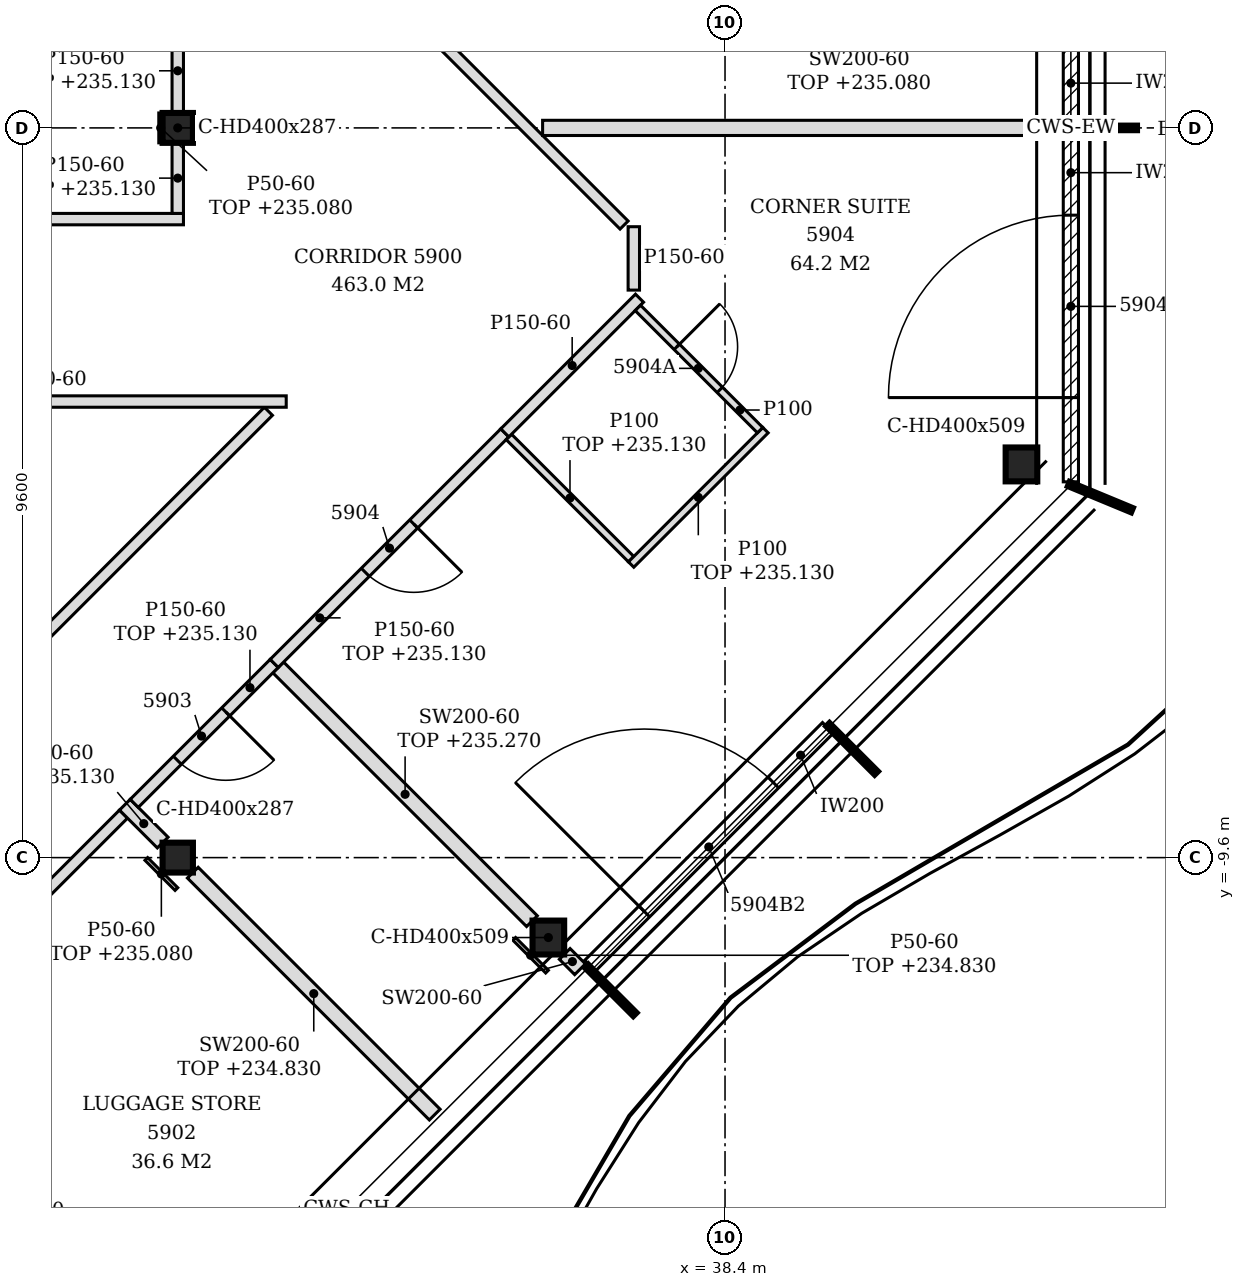
"""IFC4 building model, lengths in metres.
Left out: names, types, materials, properties, quantities, classifications, styles, units other than length and angle.
Written with IfcOpenShell. Run it as: python <this file> out.ifc"""

import sys

from ifc_helpers import new_model, si_unit, direction, frame, frame_2d, origin, origin_2d, place, context, subcontext, project, spatial, polyline, rectangle, i_section, outline, extrude, element, fill, save


model = new_model("IFC4")
c1 = context("Model", 3, precision=1e-05, world=origin(), true_north=direction((0.0, 1.0)))
c2 = subcontext(c1, "Body", "Model", "MODEL_VIEW")
j1 = project(units=[si_unit("LENGTHUNIT", "METRE"), si_unit("PLANEANGLEUNIT", "RADIAN")], contexts=[c1])
p1 = place(None, origin())
s1 = spatial("IfcSite", under=j1, at=p1, CompositionType="ELEMENT")
p2 = place(p1, origin())
s2 = spatial("IfcBuilding", under=s1, at=p2, CompositionType="ELEMENT")
p3 = place(p2, frame((0.0, 0.0, 232.2)))
s3 = spatial("IfcBuildingStorey", under=s2, at=p3, CompositionType="ELEMENT", Elevation=232.2)
for number, where, z_axis, x_axis in (
    (1, (36.076, -10.652, -0.15), (0.0, 0.0, 1.0), (1.0, 0.0, 0.0)),
    (2, (42.3, -4.427, -0.15), (0.0, 0.0, 1.0), (1.0, 0.0, 0.0)),
):
    element("IfcColumn", number, at=place(p3, frame(where, z_axis=z_axis, x_axis=x_axis)), inside=s3, PredefinedType="COLUMN", context=c2, shape_type="SweptSolid", body=[
        extrude(i_section(OverallWidth=0.416, OverallDepth=0.446, WebThickness=0.039, FlangeThickness=0.063, FilletRadius=0.015, at=origin_2d()), origin(), (0.0, 0.0, 1.0), 3.6),
    ])
for number, where, z_axis, x_axis in (
    (3, (31.2, -9.6, -0.15), (0.0, 0.0, 1.0), (1.0, 0.0, 0.0)),
    (4, (31.2, 0.0, -0.15), (0.0, 0.0, 1.0), (1.0, 0.0, 0.0)),
):
    element("IfcColumn", number, at=place(p3, frame(where, z_axis=z_axis, x_axis=x_axis)), inside=s3, PredefinedType="COLUMN", context=c2, shape_type="SweptSolid", body=[
        extrude(i_section(OverallWidth=0.399, OverallDepth=0.393, WebThickness=0.023, FlangeThickness=0.037, FilletRadius=0.015, at=origin_2d()), origin(), (0.0, 0.0, 1.0), 3.6),
    ])
p4 = place(p3, frame((36.62, -11.026, 0.0), z_axis=(0.0, 0.0, 1.0), x_axis=(0.707106781187, 0.707106781187, 0.0)))
e5 = element("IfcWall", 5, at=p4, inside=s3, PredefinedType="NOTDEFINED", context=c2, shape_type="SweptSolid", body=[
    extrude(rectangle(XDim=4.431, YDim=0.2, at=frame_2d((2.215, 0.0))), origin(), (0.0, 0.0, 1.0), 3.45),
])
p5 = place(p4, frame((1.015, 0.0, 0.0)))
e6 = element("IfcOpeningElement", 6, at=p5, cuts=e5, PredefinedType="OPENING", context=c2, shape_type="SweptSolid", body=[
    extrude(rectangle(XDim=2.4, YDim=2.4, at=frame_2d((1.2, 1.2))), frame((0.0, 0.11, 0.0), z_axis=(0.0, -1.0, 0.0), x_axis=(1.0, 0.0, 0.0)), (0.0, 0.0, 1.0), 0.22),
])
p6 = place(p3, frame((42.95, -4.656, 0.0), z_axis=(0.0, 0.0, 1.0), x_axis=(0.0, 1.0, 0.0)))
e7 = element("IfcWall", 7, at=p6, inside=s3, PredefinedType="NOTDEFINED", context=c2, shape_type="SweptSolid", body=[
    extrude(rectangle(XDim=4.626, YDim=0.2, at=frame_2d((2.313, 0.0))), origin(), (0.0, 0.0, 1.0), 3.45),
])
p7 = place(p6, frame((1.108, 0.0, 0.0)))
e8 = element("IfcOpeningElement", 8, at=p7, cuts=e7, PredefinedType="OPENING", context=c2, shape_type="SweptSolid", body=[
    extrude(rectangle(XDim=2.4, YDim=2.4, at=frame_2d((1.2, 1.2))), frame((0.0, 0.11, 0.0), z_axis=(0.0, -1.0, 0.0), x_axis=(1.0, 0.0, 0.0)), (0.0, 0.0, 1.0), 0.22),
])
p8 = place(p3, frame((42.95, 0.03, 0.0), z_axis=(0.0, 0.0, 1.0), x_axis=(0.0, 1.0, 0.0)))
e9 = element("IfcWall", 9, at=p8, inside=s3, PredefinedType="NOTDEFINED", context=c2, shape_type="SweptSolid", body=[
    extrude(rectangle(XDim=4.626, YDim=0.2, at=frame_2d((2.313, 0.0))), origin(), (0.0, 0.0, 1.0), 3.45),
])
p9 = place(p8, frame((1.118, 0.0, 0.0)))
e10 = element("IfcOpeningElement", 10, at=p9, cuts=e9, PredefinedType="OPENING", context=c2, shape_type="SweptSolid", body=[
    extrude(rectangle(XDim=2.4, YDim=2.4, at=frame_2d((1.2, 1.2))), frame((0.0, 0.11, 0.0), z_axis=(0.0, -1.0, 0.0), x_axis=(1.0, 0.0, 0.0)), (0.0, 0.0, 1.0), 0.22),
])
p10 = place(p3, frame((29.636, -16.66, 0.0), z_axis=(0.0, 0.0, 1.0), x_axis=(-0.707207037357, 0.707006510799, 0.0)))
e11 = element("IfcWall", 11, at=p10, inside=s3, PredefinedType="PARTITIONING", context=c2, shape_type="SweptSolid", body=[
    extrude(rectangle(XDim=4.87, YDim=0.2, at=frame_2d((2.435, 0.0))), origin(), (0.0, 0.0, 1.0), 2.88),
])
p11 = place(p3, frame((26.316, -13.199, 0.0), z_axis=(0.0, 0.0, 1.0), x_axis=(0.707024001185, 0.707189551498, 0.0)))
e12 = element("IfcWall", 12, at=p11, inside=s3, PredefinedType="PARTITIONING", context=c2, shape_type="SweptSolid", body=[
    extrude(rectangle(XDim=5.899, YDim=0.15, at=frame_2d((2.949, 0.0))), origin(), (0.0, 0.0, 1.0), 2.88),
])
p12 = place(p11, frame((2.5, 0.0, 0.0)))
e13 = element("IfcOpeningElement", 13, at=p12, cuts=e12, PredefinedType="OPENING", context=c2, shape_type="SweptSolid", body=[
    extrude(rectangle(XDim=0.9, YDim=2.1, at=frame_2d((0.45, 1.05))), frame((0.0, 0.085, 0.0), z_axis=(0.0, -1.0, 0.0), x_axis=(1.0, 0.0, 0.0)), (0.0, 0.0, 1.0), 0.17),
])
p13 = place(p3, frame((34.581, -12.981, 0.0), z_axis=(0.0, 0.0, 1.0), x_axis=(-0.707133900936, 0.707079660397, 0.0)))
e14 = element("IfcWall", 14, at=p13, inside=s3, PredefinedType="PARTITIONING", context=c2, shape_type="SweptSolid", body=[
    extrude(rectangle(XDim=4.501, YDim=0.2, at=frame_2d((2.25, 0.0))), origin(), (0.0, 0.0, 1.0), 2.63),
])
p14 = place(p3, frame((24.468, -11.653, 0.0), z_axis=(0.0, 0.0, 1.0), x_axis=(0.707095889299, 0.707117672906, 0.0)))
e15 = element("IfcWall", 15, at=p14, inside=s3, PredefinedType="PARTITIONING", context=c2, shape_type="SweptSolid", body=[
    extrude(rectangle(XDim=11.208, YDim=0.15, at=frame_2d((5.604, 0.0))), origin(), (0.0, 0.0, 1.0), 2.88),
])
p15 = place(p3, frame((36.493, -11.069, 0.0), z_axis=(0.0, 0.0, 1.0), x_axis=(-0.707534423513, 0.706678880075, 0.0)))
e16 = element("IfcWall", 16, at=p15, inside=s3, PredefinedType="PARTITIONING", context=c2, shape_type="SweptSolid", body=[
    extrude(rectangle(XDim=0.285, YDim=0.2, at=frame_2d((0.143, 0.0))), origin(), (0.0, 0.0, 1.0), 3.45),
])
p16 = place(p3, frame((35.86, -10.436, 0.0), z_axis=(0.0, 0.0, 1.0), x_axis=(-0.707106781187, 0.707106781187, 0.0)))
e17 = element("IfcWall", 17, at=p16, inside=s3, PredefinedType="PARTITIONING", context=c2, shape_type="SweptSolid", body=[
    extrude(rectangle(XDim=4.721, YDim=0.2, at=frame_2d((2.36, 0.0))), origin(), (0.0, 0.0, 1.0), 3.07),
])
p17 = place(p3, frame((31.002, -9.402, 0.0), z_axis=(0.0, 0.0, 1.0), x_axis=(-0.707106781187, 0.707106781187, 0.0)))
e18 = element("IfcWall", 18, at=p17, inside=s3, PredefinedType="PARTITIONING", context=c2, shape_type="SweptSolid", body=[
    extrude(rectangle(XDim=0.704, YDim=0.2, at=frame_2d((0.352, 0.0))), origin(), (0.0, 0.0, 1.0), 2.93),
])
p18 = place(p3, frame((30.628, -8.886, 0.0), z_axis=(0.0, 0.0, 1.0), x_axis=(0.707106781187, 0.707106781187, 0.0)))
e19 = element("IfcWall", 19, at=p18, inside=s3, PredefinedType="PARTITIONING", context=c2, shape_type="SweptSolid", body=[
    extrude(rectangle(XDim=2.604, YDim=0.15, at=frame_2d((1.302, 0.0))), origin(), (0.0, 0.0, 1.0), 2.93),
])
p19 = place(p18, frame((0.802, 0.0, 0.0)))
e20 = element("IfcOpeningElement", 20, at=p19, cuts=e19, PredefinedType="OPENING", context=c2, shape_type="SweptSolid", body=[
    extrude(rectangle(XDim=0.9, YDim=2.1, at=frame_2d((0.45, 1.05))), frame((0.0, 0.085, 0.0), z_axis=(0.0, -1.0, 0.0), x_axis=(1.0, 0.0, 0.0)), (0.0, 0.0, 1.0), 0.17),
])
p20 = place(p3, frame((32.469, -7.045, 0.0), z_axis=(0.0, 0.0, 1.0), x_axis=(0.70722059203, 0.706992952022, 0.0)))
e21 = element("IfcWall", 21, at=p20, inside=s3, PredefinedType="PARTITIONING", context=c2, shape_type="SweptSolid", body=[
    extrude(rectangle(XDim=4.29, YDim=0.15, at=frame_2d((2.145, 0.0))), origin(), (0.0, 0.0, 1.0), 2.93),
])
p21 = place(p20, frame((1.695, 0.0, 0.0)))
e22 = element("IfcOpeningElement", 22, at=p21, cuts=e21, PredefinedType="OPENING", context=c2, shape_type="SweptSolid", body=[
    extrude(rectangle(XDim=0.9, YDim=2.1, at=frame_2d((0.45, 1.05))), frame((0.0, 0.085, 0.0), z_axis=(0.0, -1.0, 0.0), x_axis=(1.0, 0.0, 0.0)), (0.0, 0.0, 1.0), 0.17),
])
p22 = place(p3, frame((37.165, -5.674, 0.0), z_axis=(0.0, 0.0, 1.0), x_axis=(-0.707106781187, 0.707106781187, 0.0)))
e23 = element("IfcWall", 23, at=p22, inside=s3, PredefinedType="PARTITIONING", context=c2, shape_type="SweptSolid", body=[
    extrude(rectangle(XDim=2.275, YDim=0.1, at=frame_2d((1.137, 0.0))), origin(), (0.0, 0.0, 1.0), 2.93),
])
p23 = place(p3, frame((37.165, -5.744, 0.0), z_axis=(0.0, 0.0, 1.0), x_axis=(0.707155609469, 0.707057949532, 0.0)))
e24 = element("IfcWall", 24, at=p23, inside=s3, PredefinedType="PARTITIONING", context=c2, shape_type="SweptSolid", body=[
    extrude(rectangle(XDim=2.5, YDim=0.1, at=frame_2d((1.25, 0.0))), origin(), (0.0, 0.0, 1.0), 2.93),
])
p24 = place(p3, frame((35.503, -4.012, 0.0), z_axis=(0.0, 0.0, 1.0), x_axis=(0.707106781187, 0.707106781187, 0.0)))
e25 = element("IfcWall", 25, at=p24, inside=s3, PredefinedType="PARTITIONING", context=c2, shape_type="SweptSolid", body=[
    extrude(rectangle(XDim=2.506, YDim=0.15, at=frame_2d((1.253, 0.0))), origin(), (0.0, 0.0, 1.0), 3.45),
])
p25 = place(p3, frame((38.862, -3.977, 0.0), z_axis=(0.0, 0.0, 1.0), x_axis=(-0.707106781187, 0.707106781187, 0.0)))
e26 = element("IfcWall", 26, at=p25, inside=s3, PredefinedType="PARTITIONING", context=c2, shape_type="SweptSolid", body=[
    extrude(rectangle(XDim=2.275, YDim=0.1, at=frame_2d((1.137, 0.0))), origin(), (0.0, 0.0, 1.0), 3.45),
])
p26 = place(p25, frame((0.75, 0.0, 0.0)))
e27 = element("IfcOpeningElement", 27, at=p26, cuts=e26, PredefinedType="OPENING", context=c2, shape_type="SweptSolid", body=[
    extrude(rectangle(XDim=0.8, YDim=2.1, at=frame_2d((0.4, 1.05))), frame((0.0, 0.06, 0.0), z_axis=(0.0, -1.0, 0.0), x_axis=(1.0, 0.0, 0.0)), (0.0, 0.0, 1.0), 0.12),
])
p27 = place(p3, frame((19.125, -3.6, 0.0), z_axis=(0.0, 0.0, 1.0), x_axis=(1.0, 0.0, 0.0)))
e28 = element("IfcWall", 28, at=p27, inside=s3, PredefinedType="PARTITIONING", context=c2, shape_type="SweptSolid", body=[
    extrude(outline(polyline([(0.0, 0.0), (13.502, 0.0), (13.502, 3.45), (12.225, 3.45), (12.223, 2.93), (11.925, 2.93), (11.923, 3.45), (0.225, 3.45), (0.223, 2.83), (0.0, 2.83), (0.0, 0.0)])), frame((0.0, 0.075, 0.0), z_axis=(0.0, -1.0, 0.0), x_axis=(1.0, 0.0, 0.0)), (0.0, 0.0, 1.0), 0.15),
])
p28 = place(p27, frame((6.286, 0.0, 0.0)))
e29 = element("IfcOpeningElement", 29, at=p28, cuts=e28, PredefinedType="OPENING", context=c2, shape_type="SweptSolid", body=[
    extrude(rectangle(XDim=0.9, YDim=2.1, at=frame_2d((0.45, 1.05))), frame((0.0, 0.085, 0.0), z_axis=(0.0, -1.0, 0.0), x_axis=(1.0, 0.0, 0.0)), (0.0, 0.0, 1.0), 0.17),
])
p29 = place(p3, frame((37.2, -2.134, 0.0), z_axis=(0.0, 0.0, 1.0), x_axis=(0.0, 1.0, 0.0)))
e30 = element("IfcWall", 30, at=p29, inside=s3, PredefinedType="PARTITIONING", context=c2, shape_type="SweptSolid", body=[
    extrude(rectangle(XDim=0.834, YDim=0.15, at=frame_2d((0.417, 0.0))), origin(), (0.0, 0.0, 1.0), 3.45),
])
p30 = place(p3, frame((37.072, -1.278, 0.0), z_axis=(0.0, 0.0, 1.0), x_axis=(-0.707106781187, 0.707106781187, 0.0)))
e31 = element("IfcWall", 31, at=p30, inside=s3, PredefinedType="PARTITIONING", context=c2, shape_type="SweptSolid", body=[
    extrude(rectangle(XDim=20.294, YDim=0.15, at=frame_2d((10.147, 0.0))), origin(), (0.0, 0.0, 1.0), 2.88),
])
p31 = place(p30, frame((3.824, 0.0, 0.0)))
e32 = element("IfcOpeningElement", 32, at=p31, cuts=e31, PredefinedType="OPENING", context=c2, shape_type="SweptSolid", body=[
    extrude(rectangle(XDim=0.9, YDim=2.1, at=frame_2d((0.45, 1.05))), frame((0.0, 0.085, 0.0), z_axis=(0.0, -1.0, 0.0), x_axis=(1.0, 0.0, 0.0)), (0.0, 0.0, 1.0), 0.17),
])
p32 = place(p30, frame((10.042, 0.0, 0.0)))
e33 = element("IfcOpeningElement", 33, at=p32, cuts=e31, PredefinedType="OPENING", context=c2, shape_type="SweptSolid", body=[
    extrude(rectangle(XDim=0.9, YDim=2.1, at=frame_2d((0.45, 1.05))), frame((0.0, 0.085, 0.0), z_axis=(0.0, -1.0, 0.0), x_axis=(1.0, 0.0, 0.0)), (0.0, 0.0, 1.0), 0.17),
])
p33 = place(p30, frame((14.443, 0.0, 0.0)))
e34 = element("IfcOpeningElement", 34, at=p33, cuts=e31, PredefinedType="OPENING", context=c2, shape_type="SweptSolid", body=[
    extrude(rectangle(XDim=0.9, YDim=2.1, at=frame_2d((0.45, 1.05))), frame((0.0, 0.085, 0.0), z_axis=(0.0, -1.0, 0.0), x_axis=(1.0, 0.0, 0.0)), (0.0, 0.0, 1.0), 0.17),
])
p34 = place(p3, frame((19.125, -1.2, 0.0), z_axis=(0.0, 0.0, 1.0), x_axis=(1.0, 0.0, 0.0)))
e35 = element("IfcWall", 35, at=p34, inside=s3, PredefinedType="PARTITIONING", context=c2, shape_type="SweptSolid", body=[
    extrude(outline(polyline([(0.0, 0.0), (12.15, 0.0), (12.15, 2.93), (11.925, 2.93), (11.923, 3.45), (0.225, 3.45), (0.223, 2.83), (0.0, 2.83), (0.0, 0.0)])), frame((0.0, 0.075, 0.0), z_axis=(0.0, -1.0, 0.0), x_axis=(1.0, 0.0, 0.0)), (0.0, 0.0, 1.0), 0.15),
])
p35 = place(p3, frame((31.2, -1.125, 0.0), z_axis=(0.0, 0.0, 1.0), x_axis=(0.0, 1.0, 0.0)))
e36 = element("IfcWall", 36, at=p35, inside=s3, PredefinedType="PARTITIONING", context=c2, shape_type="SweptSolid", body=[
    extrude(rectangle(XDim=0.928, YDim=0.15, at=frame_2d((0.464, 0.0))), origin(), (0.0, 0.0, 1.0), 2.93),
])
p36 = place(p3, frame((36.0, 0.0, 0.0), z_axis=(0.0, 0.0, 1.0), x_axis=(1.0, 0.0, 0.0)))
e37 = element("IfcWall", 37, at=p36, inside=s3, PredefinedType="PARTITIONING", context=c2, shape_type="SweptSolid", body=[
    extrude(rectangle(XDim=6.85, YDim=0.2, at=frame_2d((3.425, 0.0))), origin(), (0.0, 0.0, 1.0), 2.88),
])
p37 = place(p3, frame((31.2, 0.197, 0.0), z_axis=(0.0, 0.0, 1.0), x_axis=(0.0, 1.0, 0.0)))
e38 = element("IfcWall", 38, at=p37, inside=s3, PredefinedType="PARTITIONING", context=c2, shape_type="SweptSolid", body=[
    extrude(rectangle(XDim=1.11, YDim=0.15, at=frame_2d((0.555, 0.0))), origin(), (0.0, 0.0, 1.0), 2.93),
])
p38 = place(p3, frame((31.182, -10.014, 0.0), z_axis=(0.0, 0.0, 1.0), x_axis=(-0.707106781187, 0.707106781187, 0.0)))
e39 = element("IfcWall", 39, at=p38, inside=s3, PredefinedType="PARTITIONING", context=c2, shape_type="SweptSolid", body=[
    extrude(rectangle(XDim=0.56, YDim=0.05, at=frame_2d((0.28, 0.0))), origin(), (0.0, 0.0, 1.0), 2.88),
])
p39 = place(p3, frame((36.058, -11.1, 0.0), z_axis=(0.0, 0.0, 1.0), x_axis=(-0.707307009627, 0.706906496032, 0.0)))
e40 = element("IfcWall", 40, at=p39, inside=s3, PredefinedType="PARTITIONING", context=c2, shape_type="SweptSolid", body=[
    extrude(rectangle(XDim=0.61, YDim=0.05, at=frame_2d((0.305, 0.0))), origin(), (0.0, 0.0, 1.0), 2.63),
])
p40 = place(p3, frame((30.976, -0.197, 0.0), z_axis=(0.0, 0.0, 1.0), x_axis=(0.0, 1.0, 0.0)))
e41 = element("IfcWall", 41, at=p40, inside=s3, PredefinedType="PARTITIONING", context=c2, shape_type="SweptSolid", body=[
    extrude(rectangle(XDim=0.393, YDim=0.05, at=frame_2d((0.197, 0.0))), origin(), (0.0, 0.0, 1.0), 2.88),
])
p41 = place(p5, origin())
e42 = element("IfcDoor", 42, at=p41, inside=s3, OperationType="SINGLE_SWING_LEFT", PredefinedType="DOOR", context=c2, shape_type="SweptSolid", body=[
    extrude(rectangle(XDim=2.4, YDim=2.4, at=frame_2d((1.2, 1.2))), frame((0.0, 0.025, 0.0), z_axis=(0.0, -1.0, 0.0), x_axis=(1.0, 0.0, 0.0)), (0.0, 0.0, 1.0), 0.05),
])
fill(e6, e42)
p42 = place(p7, origin())
e43 = element("IfcDoor", 43, at=p42, inside=s3, OperationType="SINGLE_SWING_LEFT", PredefinedType="DOOR", context=c2, shape_type="SweptSolid", body=[
    extrude(rectangle(XDim=2.4, YDim=2.4, at=frame_2d((1.2, 1.2))), frame((0.0, 0.025, 0.0), z_axis=(0.0, -1.0, 0.0), x_axis=(1.0, 0.0, 0.0)), (0.0, 0.0, 1.0), 0.05),
])
fill(e8, e43)
p43 = place(p19, frame((0.9, 0.0, 0.0), z_axis=(0.0, 0.0, 1.0), x_axis=(-1.0, 0.0, 0.0)))
e44 = element("IfcDoor", 44, at=p43, inside=s3, OperationType="SINGLE_SWING_LEFT", PredefinedType="DOOR", context=c2, shape_type="SweptSolid", body=[
    extrude(rectangle(XDim=0.9, YDim=2.1, at=frame_2d((0.45, 1.05))), frame((0.0, 0.025, 0.0), z_axis=(0.0, -1.0, 0.0), x_axis=(1.0, 0.0, 0.0)), (0.0, 0.0, 1.0), 0.05),
])
fill(e20, e44)
p44 = place(p21, frame((0.9, 0.0, 0.0), z_axis=(0.0, 0.0, 1.0), x_axis=(-1.0, 0.0, 0.0)))
e45 = element("IfcDoor", 45, at=p44, inside=s3, OperationType="SINGLE_SWING_LEFT", PredefinedType="DOOR", context=c2, shape_type="SweptSolid", body=[
    extrude(rectangle(XDim=0.9, YDim=2.1, at=frame_2d((0.45, 1.05))), frame((0.0, 0.025, 0.0), z_axis=(0.0, -1.0, 0.0), x_axis=(1.0, 0.0, 0.0)), (0.0, 0.0, 1.0), 0.05),
])
fill(e22, e45)
p45 = place(p26, frame((0.8, 0.0, 0.0), z_axis=(0.0, 0.0, 1.0), x_axis=(-1.0, 0.0, 0.0)))
e46 = element("IfcDoor", 46, at=p45, inside=s3, OperationType="SINGLE_SWING_LEFT", PredefinedType="DOOR", context=c2, shape_type="SweptSolid", body=[
    extrude(rectangle(XDim=0.8, YDim=2.1, at=frame_2d((0.4, 1.05))), frame((0.0, 0.025, 0.0), z_axis=(0.0, -1.0, 0.0), x_axis=(1.0, 0.0, 0.0)), (0.0, 0.0, 1.0), 0.05),
])
fill(e27, e46)
save(model, sys.argv[1])
